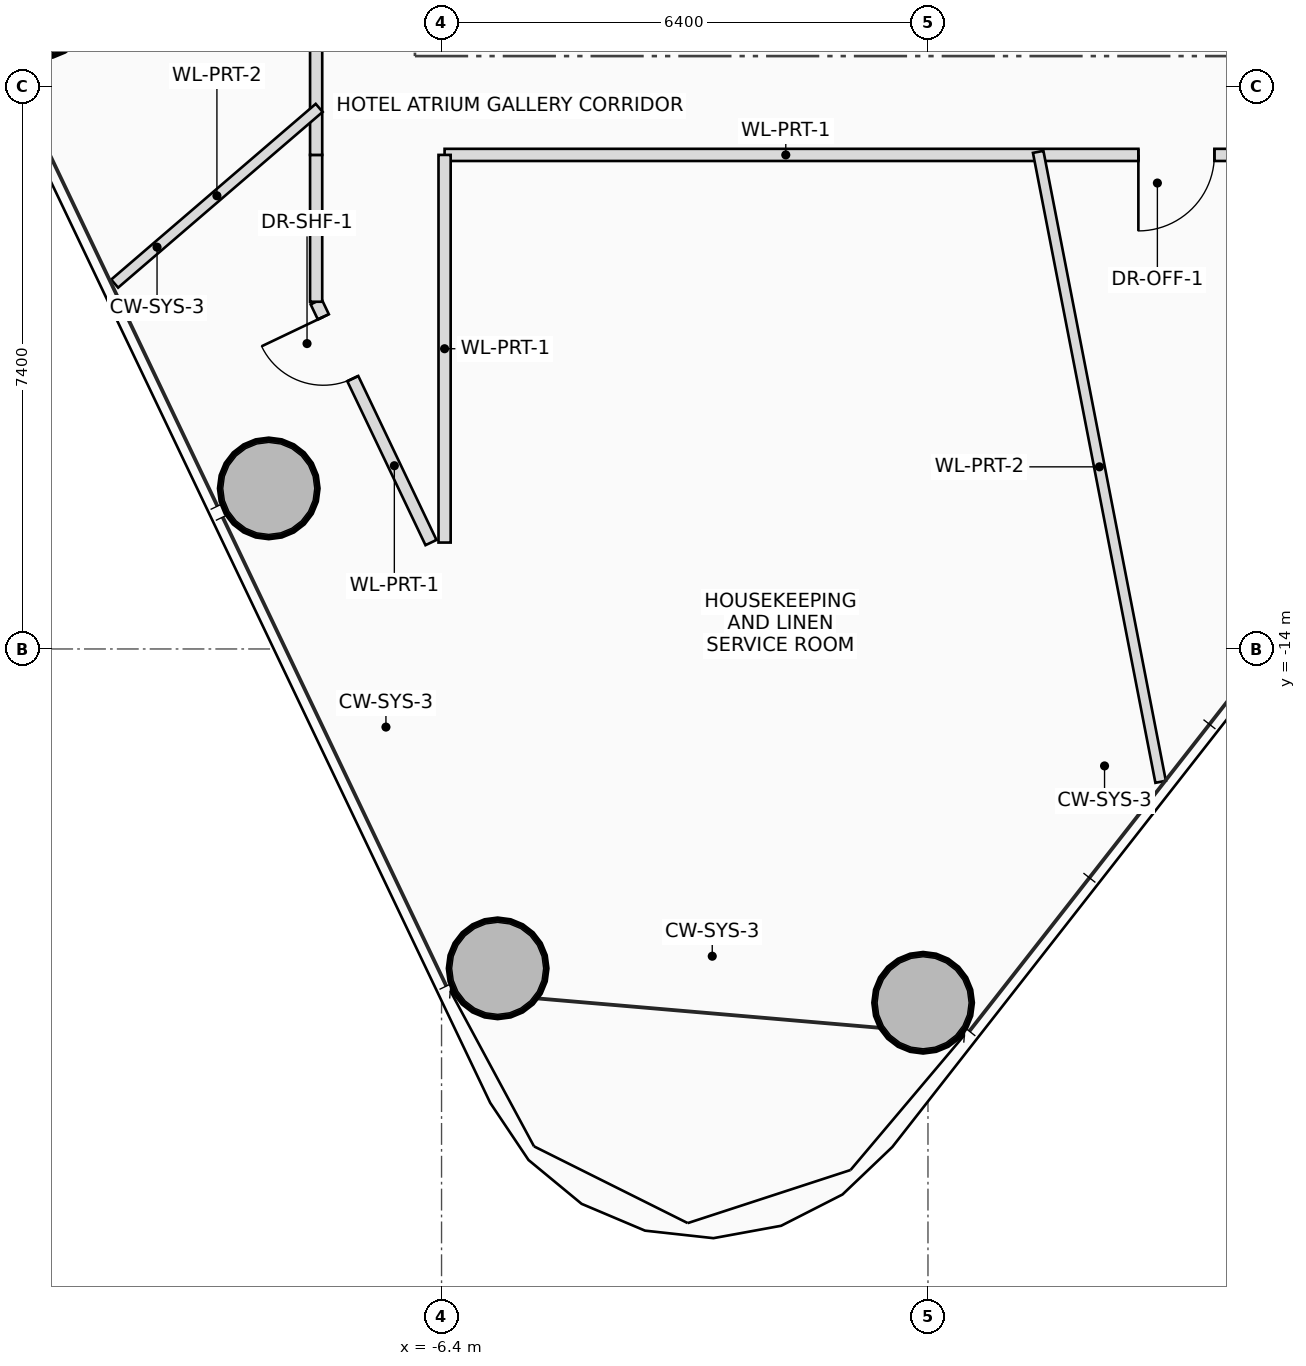
"""IFC4 building model, lengths in metres.
Left out: names, types, materials, properties, quantities, classifications, styles, units other than length and angle.
Written with IfcOpenShell. Run it as: python <this file> out.ifc"""

import sys

from ifc_helpers import new_model, si_unit, direction, frame, frame_2d, origin, origin_2d, place, context, subcontext, project, spatial, rectangle, hollow_circle, extrude, source, transform, mapped, element, fill, save


model = new_model("IFC4")
c1 = context("Model", 3, precision=1e-05, world=origin(), true_north=direction((0.0, 1.0)))
c2 = subcontext(c1, "Body", "Model", "MODEL_VIEW")
j1 = project(units=[si_unit("LENGTHUNIT", "METRE"), si_unit("PLANEANGLEUNIT", "RADIAN")], contexts=[c1])
p1 = place(None, origin())
s1 = spatial("IfcSite", under=j1, at=p1, CompositionType="ELEMENT")
p2 = place(p1, origin())
s2 = spatial("IfcBuilding", under=s1, at=p2, CompositionType="ELEMENT")
p3 = place(p2, frame((0.0, 0.0, 146.75)))
s3 = spatial("IfcBuildingStorey", under=s2, at=p3, CompositionType="ELEMENT", Elevation=146.75)
m1 = source(origin(), c2, "Body", "SweptSolid", [
    extrude(hollow_circle(Radius=0.65, WallThickness=0.045, at=origin_2d()), origin(), (0.0, 0.0, 1.0), 3.45),
])
for number, where, z_axis, x_axis in (
    (1, (-0.064, -18.655, 0.0), (0.0, 0.0, 1.0), (1.0, 0.0, 0.0)),
    (2, (-11.685, -5.573, 0.0), (0.0, 0.0, 1.0), (1.0, 0.0, 0.0)),
    (3, (-8.674, -11.888, 0.0), (0.0, 0.0, 1.0), (1.0, 0.0, 0.0)),
    (4, (-5.662, -18.202, 0.0), (0.0, 0.0, 1.0), (1.0, 0.0, 0.0)),
):
    element("IfcColumn", number, at=place(p3, frame(where, z_axis=z_axis, x_axis=x_axis)), inside=s3, PredefinedType="COLUMN", context=c2, shape_type="MappedRepresentation", body=[
        mapped(m1, transform((0.0, 0.0, 0.0), scale=1.0)),
    ])
p4 = place(p3, frame((-6.539, -12.6, 0.0), z_axis=(0.0, 0.0, 1.0), x_axis=(-0.430527444218, 0.902577486853, 0.0)))
e5 = element("IfcWall", 5, at=p4, inside=s3, PredefinedType="PARTITIONING", context=c2, shape_type="SweptSolid", body=[
    extrude(rectangle(XDim=3.51, YDim=0.16, at=frame_2d((1.755, 0.0))), origin(), (0.0, 0.0, 1.0), 2.605),
])
p5 = place(p4, frame((2.39, 0.0, 0.0)))
e6 = element("IfcOpeningElement", 6, at=p5, cuts=e5, PredefinedType="OPENING", context=c2, shape_type="SweptSolid", body=[
    extrude(rectangle(XDim=0.9, YDim=2.05, at=frame_2d((0.45, 1.025))), frame((0.0, 0.09, 0.0), z_axis=(0.0, -1.0, 0.0), x_axis=(1.0, 0.0, 0.0)), (0.0, 0.0, 1.0), 0.18),
])
p6 = place(p3, frame((-8.05, -9.432, 0.0), z_axis=(0.0, 0.0, 1.0), x_axis=(0.0, 1.0, 0.0)))
e7 = element("IfcWall", 7, at=p6, inside=s3, PredefinedType="PARTITIONING", context=c2, shape_type="SweptSolid", body=[
    extrude(rectangle(XDim=1.932, YDim=0.16, at=frame_2d((0.966, 0.0))), origin(), (0.0, 0.0, 1.0), 2.805),
])
p7 = place(p3, frame((-8.05, -7.5, 0.0), z_axis=(0.0, 0.0, 1.0), x_axis=(0.0, 1.0, 0.0)))
e8 = element("IfcWall", 8, at=p7, inside=s3, PredefinedType="PARTITIONING", context=c2, shape_type="SweptSolid", body=[
    extrude(rectangle(XDim=15.0, YDim=0.16, at=frame_2d((7.5, 0.0))), origin(), (0.0, 0.0, 1.0), 2.605),
])
p8 = place(p7, frame((7.0, 0.0, 0.0)))
e9 = element("IfcOpeningElement", 9, at=p8, cuts=e8, PredefinedType="OPENING", context=c2, shape_type="SweptSolid", body=[
    extrude(rectangle(XDim=1.0, YDim=2.25, at=frame_2d((0.5, 1.125))), frame((0.0, 0.09, 0.0), z_axis=(0.0, -1.0, 0.0), x_axis=(1.0, 0.0, 0.0)), (0.0, 0.0, 1.0), 0.18),
])
p9 = place(p3, frame((5.25, -7.5, 0.0), z_axis=(0.0, 0.0, 1.0), x_axis=(-1.0, 0.0, 0.0)))
e10 = element("IfcWall", 10, at=p9, inside=s3, PredefinedType="PARTITIONING", context=c2, shape_type="SweptSolid", body=[
    extrude(rectangle(XDim=11.61, YDim=0.16, at=frame_2d((5.805, 0.0))), origin(), (0.0, 0.0, 1.0), 2.605),
])
p10 = place(p9, frame((1.482, 0.0, 0.0)))
e11 = element("IfcOpeningElement", 11, at=p10, cuts=e10, PredefinedType="OPENING", context=c2, shape_type="SweptSolid", body=[
    extrude(rectangle(XDim=1.0, YDim=2.25, at=frame_2d((0.5, 1.125))), frame((0.0, 0.09, 0.0), z_axis=(0.0, -1.0, 0.0), x_axis=(1.0, 0.0, 0.0)), (0.0, 0.0, 1.0), 0.18),
])
p11 = place(p3, frame((-6.36, -7.5, 0.0), z_axis=(0.0, 0.0, 1.0), x_axis=(0.0, -1.0, 0.0)))
e12 = element("IfcWall", 12, at=p11, inside=s3, PredefinedType="PARTITIONING", context=c2, shape_type="SweptSolid", body=[
    extrude(rectangle(XDim=5.1, YDim=0.16, at=frame_2d((2.55, 0.0))), origin(), (0.0, 0.0, 1.0), 3.25),
])
p12 = place(p3, frame((-8.01, -6.882, 0.0), z_axis=(0.0, 0.0, 1.0), x_axis=(-0.75852259091, -0.651646744087, 0.0)))
e13 = element("IfcWall", 13, at=p12, inside=s3, PredefinedType="PARTITIONING", context=c2, shape_type="SweptSolid", body=[
    extrude(rectangle(XDim=3.548, YDim=0.14, at=frame_2d((1.774, 0.0))), origin(), (0.0, 0.0, 1.0), 2.765),
])
p13 = place(p3, frame((1.45, -7.46, 0.0), z_axis=(0.0, 0.0, 1.0), x_axis=(0.190791487028, -0.981630586564, 0.0)))
e14 = element("IfcWall", 14, at=p13, inside=s3, PredefinedType="PARTITIONING", context=c2, shape_type="SweptSolid", body=[
    extrude(rectangle(XDim=8.443, YDim=0.14, at=frame_2d((4.221, 0.0))), origin(), (0.0, 0.0, 1.0), 2.765),
])
p14 = place(p5, origin())
e15 = element("IfcDoor", 15, at=p14, inside=s3, OperationType="SINGLE_SWING_RIGHT", PredefinedType="DOOR", context=c2, shape_type="SweptSolid", body=[
    extrude(rectangle(XDim=0.9, YDim=2.05, at=frame_2d((0.45, 1.025))), frame((0.0, 0.025, 0.0), z_axis=(0.0, -1.0, 0.0), x_axis=(1.0, 0.0, 0.0)), (0.0, 0.0, 1.0), 0.05),
])
fill(e6, e15)
p15 = place(p10, origin())
e16 = element("IfcDoor", 16, at=p15, inside=s3, OperationType="SINGLE_SWING_RIGHT", PredefinedType="DOOR", context=c2, shape_type="SweptSolid", body=[
    extrude(rectangle(XDim=1.0, YDim=2.25, at=frame_2d((0.5, 1.125))), frame((0.0, 0.025, 0.0), z_axis=(0.0, -1.0, 0.0), x_axis=(1.0, 0.0, 0.0)), (0.0, 0.0, 1.0), 0.05),
])
fill(e11, e16)
save(model, sys.argv[1])
